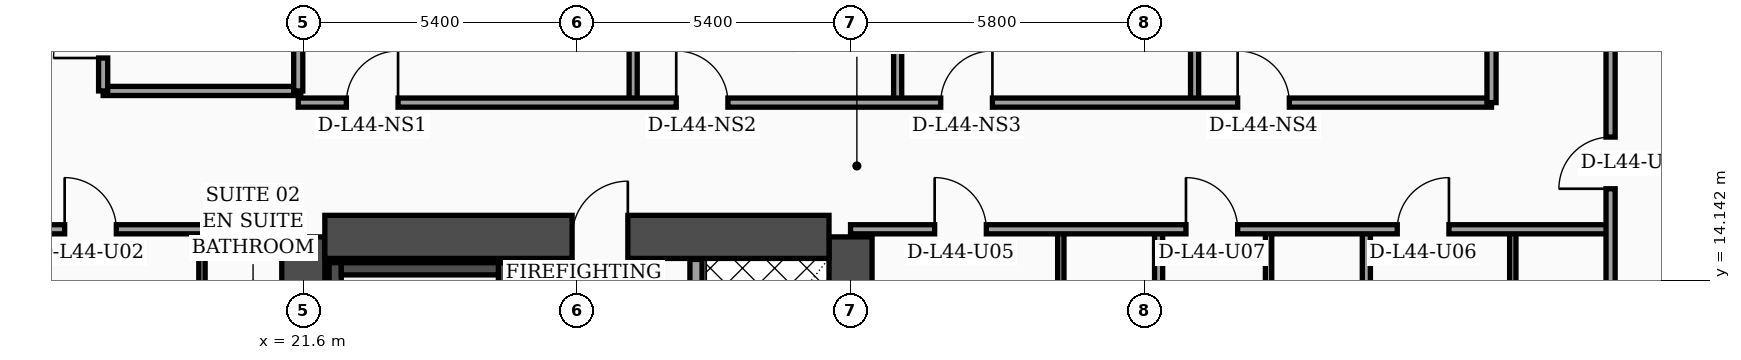
"""IFC4 building model, lengths in metres.
Left out: names, types, materials, properties, quantities, classifications, styles, units other than length and angle.
Written with IfcOpenShell. Run it as: python <this file> out.ifc"""

import sys

from ifc_helpers import new_model, si_unit, direction, frame, frame_2d, origin, place, context, subcontext, project, spatial, rectangle, extrude, element, fill, save


model = new_model("IFC4")
c1 = context("Model", 3, precision=1e-05, world=origin(), true_north=direction((0.0, 1.0)))
c2 = subcontext(c1, "Body", "Model", "MODEL_VIEW")
j1 = project(units=[si_unit("LENGTHUNIT", "METRE"), si_unit("PLANEANGLEUNIT", "RADIAN")], contexts=[c1])
p1 = place(None, origin())
s1 = spatial("IfcSite", under=j1, at=p1, CompositionType="ELEMENT")
p2 = place(p1, origin())
s2 = spatial("IfcBuilding", under=s1, at=p2, CompositionType="ELEMENT")
p3 = place(p2, frame((0.0, 0.0, 178.9)))
s3 = spatial("IfcBuildingStorey", under=s2, at=p3, CompositionType="ELEMENT", Elevation=178.9)
for number, where, z_axis, x_axis in (
    (1, (21.6, 4.6, 0.0), (0.0, 0.0, 1.0), (0.0, 1.0, 0.0)),
    (2, (32.4, 4.6, 0.0), (0.0, 0.0, 1.0), (0.0, 1.0, 0.0)),
):
    element("IfcWall", number, at=place(p3, frame(where, z_axis=z_axis, x_axis=x_axis)), inside=s3, PredefinedType="SHEAR", context=c2, shape_type="SweptSolid", body=[
        extrude(rectangle(XDim=10.4, YDim=0.85, at=frame_2d((5.2, 0.0))), origin(), (0.0, 0.0, 1.0), 3.56),
    ])
p4 = place(p3, frame((22.025, 15.0, 0.0), z_axis=(0.0, 0.0, 1.0), x_axis=(1.0, 0.0, 0.0)))
e3 = element("IfcWall", 3, at=p4, inside=s3, PredefinedType="SHEAR", context=c2, shape_type="SweptSolid", body=[
    extrude(rectangle(XDim=9.95, YDim=0.85, at=frame_2d((4.975, 0.0))), origin(), (0.0, 0.0, 1.0), 3.56),
])
p5 = place(p4, frame((4.88, 0.0, 0.0)))
e4 = element("IfcOpeningElement", 4, at=p5, cuts=e3, PredefinedType="OPENING", context=c2, shape_type="SweptSolid", body=[
    extrude(rectangle(XDim=1.1, YDim=2.2, at=frame_2d((0.55, 1.1))), frame((0.0, 0.435, 0.0), z_axis=(0.0, -1.0, 0.0), x_axis=(1.0, 0.0, 0.0)), (0.0, 0.0, 1.0), 0.87),
])
p6 = place(p3, frame((22.23, 5.025, 0.0), z_axis=(0.0, 0.0, 1.0), x_axis=(0.0, 1.0, 0.0)))
e5 = element("IfcWall", 5, at=p6, inside=s3, PredefinedType="SOLIDWALL", context=c2, shape_type="SweptSolid", body=[
    extrude(rectangle(XDim=9.465, YDim=0.24, at=frame_2d((4.732, 0.0))), origin(), (0.0, 0.0, 1.0), 3.56),
])
p7 = place(p3, frame((25.57, 5.025, 0.0), z_axis=(0.0, 0.0, 1.0), x_axis=(0.0, 1.0, 0.0)))
e6 = element("IfcWall", 6, at=p7, inside=s3, PredefinedType="SOLIDWALL", context=c2, shape_type="SweptSolid", body=[
    extrude(rectangle(XDim=9.465, YDim=0.24, at=frame_2d((4.732, 0.0))), origin(), (0.0, 0.0, 1.0), 3.56),
])
p8 = place(p7, frame((0.35, 0.0, 0.0)))
e7 = element("IfcOpeningElement", 7, at=p8, cuts=e6, PredefinedType="OPENING", context=c2, shape_type="SweptSolid", body=[
    extrude(rectangle(XDim=1.15, YDim=2.2, at=frame_2d((0.575, 1.1))), frame((0.0, 0.13, 0.0), z_axis=(0.0, -1.0, 0.0), x_axis=(1.0, 0.0, 0.0)), (0.0, 0.0, 1.0), 0.26),
])
p9 = place(p3, frame((22.35, 14.37, 0.0), z_axis=(0.0, 0.0, 1.0), x_axis=(1.0, 0.0, 0.0)))
e8 = element("IfcWall", 8, at=p9, inside=s3, PredefinedType="SOLIDWALL", context=c2, shape_type="SweptSolid", body=[
    extrude(rectangle(XDim=3.1, YDim=0.24, at=frame_2d((1.55, 0.0))), origin(), (0.0, 0.0, 1.0), 3.56),
])
p10 = place(p3, frame((29.35, 5.045, 0.0), z_axis=(0.0, 0.0, 1.0), x_axis=(0.0, 1.0, 0.0)))
e9 = element("IfcWall", 9, at=p10, inside=s3, PredefinedType="SOLIDWALL", context=c2, shape_type="SweptSolid", body=[
    extrude(rectangle(XDim=9.51, YDim=0.24, at=frame_2d((4.755, 0.0))), origin(), (0.0, 0.0, 1.0), 3.56),
])
p11 = place(p10, frame((0.55, 0.0, 0.0)))
e10 = element("IfcOpeningElement", 10, at=p11, cuts=e9, PredefinedType="OPENING", context=c2, shape_type="SweptSolid", body=[
    extrude(rectangle(XDim=1.3, YDim=2.35, at=frame_2d((0.65, 1.175))), frame((0.0, 0.13, 0.0), z_axis=(0.0, -1.0, 0.0), x_axis=(1.0, 0.0, 0.0)), (0.0, 0.0, 1.0), 0.26),
])
p12 = place(p3, frame((19.6, 2.44, 0.0), z_axis=(0.0, 0.0, 1.0), x_axis=(0.0, 1.0, 0.0)))
e11 = element("IfcWall", 11, at=p12, inside=s3, PredefinedType="PARTITIONING", context=c2, shape_type="SweptSolid", body=[
    extrude(rectangle(XDim=12.71, YDim=0.125, at=frame_2d((6.355, 0.0))), origin(), (0.0, 0.0, 1.0), 2.49),
])
p13 = place(p12, frame((4.34, 0.0, 0.0)))
e12 = element("IfcOpeningElement", 12, at=p13, cuts=e11, PredefinedType="OPENING", context=c2, shape_type="SweptSolid", body=[
    extrude(rectangle(XDim=0.96, YDim=2.2, at=frame_2d((0.48, 1.1))), frame((0.0, 0.073, 0.0), z_axis=(0.0, -1.0, 0.0), x_axis=(1.0, 0.0, 0.0)), (0.0, 0.0, 1.0), 0.145),
])
p14 = place(p12, frame((10.18, 0.0, 0.0)))
e13 = element("IfcOpeningElement", 13, at=p14, cuts=e11, PredefinedType="OPENING", context=c2, shape_type="SweptSolid", body=[
    extrude(rectangle(XDim=0.9, YDim=2.15, at=frame_2d((0.45, 1.075))), frame((0.0, 0.073, 0.0), z_axis=(0.0, -1.0, 0.0), x_axis=(1.0, 0.0, 0.0)), (0.0, 0.0, 1.0), 0.145),
])
p15 = place(p3, frame((15.15, 15.15, 0.0), z_axis=(0.0, 0.0, 1.0), x_axis=(1.0, 0.0, 0.0)))
e14 = element("IfcWall", 14, at=p15, inside=s3, PredefinedType="PARTITIONING", context=c2, shape_type="SweptSolid", body=[
    extrude(rectangle(XDim=6.45, YDim=0.18, at=frame_2d((3.225, 0.0))), origin(), (0.0, 0.0, 1.0), 2.49),
])
p16 = place(p15, frame((1.74, 0.0, 0.0)))
e15 = element("IfcOpeningElement", 15, at=p16, cuts=e14, PredefinedType="OPENING", context=c2, shape_type="SweptSolid", body=[
    extrude(rectangle(XDim=1.02, YDim=2.2, at=frame_2d((0.51, 1.1))), frame((0.0, 0.1, 0.0), z_axis=(0.0, -1.0, 0.0), x_axis=(1.0, 0.0, 0.0)), (0.0, 0.0, 1.0), 0.2),
])
p17 = place(p3, frame((17.65, 17.88, 0.0), z_axis=(0.0, 0.0, 1.0), x_axis=(1.0, 0.0, 0.0)))
e16 = element("IfcWall", 16, at=p17, inside=s3, PredefinedType="PARTITIONING", context=c2, shape_type="SweptSolid", body=[
    extrude(rectangle(XDim=3.9, YDim=0.18, at=frame_2d((1.95, 0.0))), origin(), (0.0, 0.0, 1.0), 3.56),
])
p18 = place(p3, frame((21.5, 17.88, 0.0), z_axis=(0.0, 0.0, 1.0), x_axis=(0.0, 1.0, 0.0)))
e17 = element("IfcWall", 17, at=p18, inside=s3, PredefinedType="PARTITIONING", context=c2, shape_type="SweptSolid", body=[
    extrude(rectangle(XDim=6.44, YDim=0.18, at=frame_2d((3.22, 0.0))), origin(), (0.0, 0.0, 1.0), 3.09),
])
p19 = place(p3, frame((17.65, 17.88, 0.0), z_axis=(0.0, 0.0, 1.0), x_axis=(0.0, 1.0, 0.0)))
e18 = element("IfcWall", 18, at=p19, inside=s3, PredefinedType="PARTITIONING", context=c2, shape_type="SweptSolid", body=[
    extrude(rectangle(XDim=6.44, YDim=0.18, at=frame_2d((3.22, 0.0))), origin(), (0.0, 0.0, 1.0), 3.09),
])
p20 = place(p19, frame((0.65, 0.0, 0.0)))
e19 = element("IfcOpeningElement", 19, at=p20, cuts=e18, PredefinedType="OPENING", context=c2, shape_type="SweptSolid", body=[
    extrude(rectangle(XDim=0.98, YDim=2.15, at=frame_2d((0.49, 1.075))), frame((0.0, 0.1, 0.0), z_axis=(0.0, -1.0, 0.0), x_axis=(1.0, 0.0, 0.0)), (0.0, 0.0, 1.0), 0.2),
])
p21 = place(p19, frame((3.97, 0.0, 0.0)))
e20 = element("IfcOpeningElement", 20, at=p21, cuts=e18, PredefinedType="OPENING", context=c2, shape_type="SweptSolid", body=[
    extrude(rectangle(XDim=0.96, YDim=2.2, at=frame_2d((0.48, 1.1))), frame((0.0, 0.1, 0.0), z_axis=(0.0, -1.0, 0.0), x_axis=(1.0, 0.0, 0.0)), (0.0, 0.0, 1.0), 0.2),
])
p22 = place(p3, frame((36.55, 2.44, 0.0), z_axis=(0.0, 0.0, 1.0), x_axis=(0.0, 1.0, 0.0)))
e21 = element("IfcWall", 21, at=p22, inside=s3, PredefinedType="PARTITIONING", context=c2, shape_type="SweptSolid", body=[
    extrude(rectangle(XDim=12.71, YDim=0.125, at=frame_2d((6.355, 0.0))), origin(), (0.0, 0.0, 1.0), 2.94),
])
p23 = place(p22, frame((4.35, 0.0, 0.0)))
e22 = element("IfcOpeningElement", 22, at=p23, cuts=e21, PredefinedType="OPENING", context=c2, shape_type="SweptSolid", body=[
    extrude(rectangle(XDim=0.96, YDim=2.2, at=frame_2d((0.48, 1.1))), frame((0.0, 0.073, 0.0), z_axis=(0.0, -1.0, 0.0), x_axis=(1.0, 0.0, 0.0)), (0.0, 0.0, 1.0), 0.145),
])
p24 = place(p22, frame((10.21, 0.0, 0.0)))
e23 = element("IfcOpeningElement", 23, at=p24, cuts=e21, PredefinedType="OPENING", context=c2, shape_type="SweptSolid", body=[
    extrude(rectangle(XDim=0.9, YDim=2.15, at=frame_2d((0.45, 1.075))), frame((0.0, 0.073, 0.0), z_axis=(0.0, -1.0, 0.0), x_axis=(1.0, 0.0, 0.0)), (0.0, 0.0, 1.0), 0.145),
])
p25 = place(p3, frame((40.65, 2.44, 0.0), z_axis=(0.0, 0.0, 1.0), x_axis=(0.0, 1.0, 0.0)))
e24 = element("IfcWall", 24, at=p25, inside=s3, PredefinedType="PARTITIONING", context=c2, shape_type="SweptSolid", body=[
    extrude(rectangle(XDim=12.71, YDim=0.125, at=frame_2d((6.355, 0.0))), origin(), (0.0, 0.0, 1.0), 2.94),
])
p26 = place(p25, frame((4.35, 0.0, 0.0)))
e25 = element("IfcOpeningElement", 25, at=p26, cuts=e24, PredefinedType="OPENING", context=c2, shape_type="SweptSolid", body=[
    extrude(rectangle(XDim=0.96, YDim=2.2, at=frame_2d((0.48, 1.1))), frame((0.0, 0.073, 0.0), z_axis=(0.0, -1.0, 0.0), x_axis=(1.0, 0.0, 0.0)), (0.0, 0.0, 1.0), 0.145),
])
p27 = place(p25, frame((10.21, 0.0, 0.0)))
e26 = element("IfcOpeningElement", 26, at=p27, cuts=e24, PredefinedType="OPENING", context=c2, shape_type="SweptSolid", body=[
    extrude(rectangle(XDim=0.9, YDim=2.15, at=frame_2d((0.45, 1.075))), frame((0.0, 0.073, 0.0), z_axis=(0.0, -1.0, 0.0), x_axis=(1.0, 0.0, 0.0)), (0.0, 0.0, 1.0), 0.145),
])
p28 = place(p3, frame((38.48, 2.44, 0.0), z_axis=(0.0, 0.0, 1.0), x_axis=(0.0, 1.0, 0.0)))
e27 = element("IfcWall", 27, at=p28, inside=s3, PredefinedType="PARTITIONING", context=c2, shape_type="SweptSolid", body=[
    extrude(rectangle(XDim=12.71, YDim=0.16, at=frame_2d((6.355, 0.0))), origin(), (0.0, 0.0, 1.0), 2.94),
])
p29 = place(p3, frame((45.47, 2.44, 0.0), z_axis=(0.0, 0.0, 1.0), x_axis=(0.0, 1.0, 0.0)))
e28 = element("IfcWall", 28, at=p29, inside=s3, PredefinedType="PARTITIONING", context=c2, shape_type="SweptSolid", body=[
    extrude(rectangle(XDim=12.71, YDim=0.125, at=frame_2d((6.355, 0.0))), origin(), (0.0, 0.0, 1.0), 3.04),
])
p30 = place(p29, frame((4.35, 0.0, 0.0)))
e29 = element("IfcOpeningElement", 29, at=p30, cuts=e28, PredefinedType="OPENING", context=c2, shape_type="SweptSolid", body=[
    extrude(rectangle(XDim=0.96, YDim=2.2, at=frame_2d((0.48, 1.1))), frame((0.0, 0.073, 0.0), z_axis=(0.0, -1.0, 0.0), x_axis=(1.0, 0.0, 0.0)), (0.0, 0.0, 1.0), 0.145),
])
p31 = place(p29, frame((10.21, 0.0, 0.0)))
e30 = element("IfcOpeningElement", 30, at=p31, cuts=e28, PredefinedType="OPENING", context=c2, shape_type="SweptSolid", body=[
    extrude(rectangle(XDim=0.9, YDim=2.15, at=frame_2d((0.45, 1.075))), frame((0.0, 0.073, 0.0), z_axis=(0.0, -1.0, 0.0), x_axis=(1.0, 0.0, 0.0)), (0.0, 0.0, 1.0), 0.145),
])
p32 = place(p3, frame((42.58, 2.44, 0.0), z_axis=(0.0, 0.0, 1.0), x_axis=(0.0, 1.0, 0.0)))
e31 = element("IfcWall", 31, at=p32, inside=s3, PredefinedType="PARTITIONING", context=c2, shape_type="SweptSolid", body=[
    extrude(rectangle(XDim=12.71, YDim=0.16, at=frame_2d((6.355, 0.0))), origin(), (0.0, 0.0, 1.0), 3.04),
])
p33 = place(p3, frame((32.4, 15.15, 0.0), z_axis=(0.0, 0.0, 1.0), x_axis=(1.0, 0.0, 0.0)))
e32 = element("IfcWall", 32, at=p33, inside=s3, PredefinedType="PARTITIONING", context=c2, shape_type="SweptSolid", body=[
    extrude(rectangle(XDim=15.0, YDim=0.18, at=frame_2d((7.5, 0.0))), origin(), (0.0, 0.0, 1.0), 2.94),
])
p34 = place(p33, frame((1.66, 0.0, 0.0)))
e33 = element("IfcOpeningElement", 33, at=p34, cuts=e32, PredefinedType="OPENING", context=c2, shape_type="SweptSolid", body=[
    extrude(rectangle(XDim=1.02, YDim=2.2, at=frame_2d((0.51, 1.1))), frame((0.0, 0.1, 0.0), z_axis=(0.0, -1.0, 0.0), x_axis=(1.0, 0.0, 0.0)), (0.0, 0.0, 1.0), 0.2),
])
p35 = place(p33, frame((10.79, 0.0, 0.0)))
e34 = element("IfcOpeningElement", 34, at=p35, cuts=e32, PredefinedType="OPENING", context=c2, shape_type="SweptSolid", body=[
    extrude(rectangle(XDim=1.02, YDim=2.2, at=frame_2d((0.51, 1.1))), frame((0.0, 0.1, 0.0), z_axis=(0.0, -1.0, 0.0), x_axis=(1.0, 0.0, 0.0)), (0.0, 0.0, 1.0), 0.2),
])
p36 = place(p33, frame((6.62, 0.0, 0.0)))
e35 = element("IfcOpeningElement", 35, at=p36, cuts=e32, PredefinedType="OPENING", context=c2, shape_type="SweptSolid", body=[
    extrude(rectangle(XDim=1.02, YDim=2.2, at=frame_2d((0.51, 1.1))), frame((0.0, 0.1, 0.0), z_axis=(0.0, -1.0, 0.0), x_axis=(1.0, 0.0, 0.0)), (0.0, 0.0, 1.0), 0.2),
])
p37 = place(p3, frame((28.11, 17.65, 0.0), z_axis=(0.0, 0.0, 1.0), x_axis=(0.0, 1.0, 0.0)))
e36 = element("IfcWall", 36, at=p37, inside=s3, PredefinedType="PARTITIONING", context=c2, shape_type="SweptSolid", body=[
    extrude(rectangle(XDim=10.46, YDim=0.16, at=frame_2d((5.23, 0.0))), origin(), (0.0, 0.0, 1.0), 2.94),
])
p38 = place(p3, frame((33.33, 17.65, 0.0), z_axis=(0.0, 0.0, 1.0), x_axis=(0.0, 1.0, 0.0)))
e37 = element("IfcWall", 37, at=p38, inside=s3, PredefinedType="PARTITIONING", context=c2, shape_type="SweptSolid", body=[
    extrude(rectangle(XDim=13.37, YDim=0.16, at=frame_2d((6.685, 0.0))), origin(), (0.0, 0.0, 1.0), 2.94),
])
p39 = place(p3, frame((39.19, 17.65, 0.0), z_axis=(0.0, 0.0, 1.0), x_axis=(0.0, 1.0, 0.0)))
e38 = element("IfcWall", 38, at=p39, inside=s3, PredefinedType="PARTITIONING", context=c2, shape_type="SweptSolid", body=[
    extrude(rectangle(XDim=16.63, YDim=0.16, at=frame_2d((8.315, 0.0))), origin(), (0.0, 0.0, 1.0), 2.94),
])
p40 = place(p3, frame((21.5, 17.65, 0.0), z_axis=(0.0, 0.0, 1.0), x_axis=(1.0, 0.0, 0.0)))
e39 = element("IfcWall", 39, at=p40, inside=s3, PredefinedType="PARTITIONING", context=c2, shape_type="SweptSolid", body=[
    extrude(rectangle(XDim=23.55, YDim=0.18, at=frame_2d((11.775, 0.0))), origin(), (0.0, 0.0, 1.0), 2.94),
])
p41 = place(p40, frame((0.95, 0.0, 0.0)))
e40 = element("IfcOpeningElement", 40, at=p41, cuts=e39, PredefinedType="OPENING", context=c2, shape_type="SweptSolid", body=[
    extrude(rectangle(XDim=1.02, YDim=2.2, at=frame_2d((0.51, 1.1))), frame((0.0, 0.1, 0.0), z_axis=(0.0, -1.0, 0.0), x_axis=(1.0, 0.0, 0.0)), (0.0, 0.0, 1.0), 0.2),
])
p42 = place(p40, frame((7.46, 0.0, 0.0)))
e41 = element("IfcOpeningElement", 41, at=p42, cuts=e39, PredefinedType="OPENING", context=c2, shape_type="SweptSolid", body=[
    extrude(rectangle(XDim=1.02, YDim=2.2, at=frame_2d((0.51, 1.1))), frame((0.0, 0.1, 0.0), z_axis=(0.0, -1.0, 0.0), x_axis=(1.0, 0.0, 0.0)), (0.0, 0.0, 1.0), 0.2),
])
p43 = place(p40, frame((12.68, 0.0, 0.0)))
e42 = element("IfcOpeningElement", 42, at=p43, cuts=e39, PredefinedType="OPENING", context=c2, shape_type="SweptSolid", body=[
    extrude(rectangle(XDim=1.02, YDim=2.2, at=frame_2d((0.51, 1.1))), frame((0.0, 0.1, 0.0), z_axis=(0.0, -1.0, 0.0), x_axis=(1.0, 0.0, 0.0)), (0.0, 0.0, 1.0), 0.2),
])
p44 = place(p40, frame((18.54, 0.0, 0.0)))
e43 = element("IfcOpeningElement", 43, at=p44, cuts=e39, PredefinedType="OPENING", context=c2, shape_type="SweptSolid", body=[
    extrude(rectangle(XDim=1.02, YDim=2.2, at=frame_2d((0.51, 1.1))), frame((0.0, 0.1, 0.0), z_axis=(0.0, -1.0, 0.0), x_axis=(1.0, 0.0, 0.0)), (0.0, 0.0, 1.0), 0.2),
])
p45 = place(p3, frame((45.05, 17.65, 0.0), z_axis=(0.0, 0.0, 1.0), x_axis=(0.0, 1.0, 0.0)))
e44 = element("IfcWall", 44, at=p45, inside=s3, PredefinedType="PARTITIONING", context=c2, shape_type="SweptSolid", body=[
    extrude(rectangle(XDim=19.9, YDim=0.18, at=frame_2d((9.95, 0.0))), origin(), (0.0, 0.0, 1.0), 2.94),
])
p46 = place(p3, frame((47.4, 2.44, 0.0), z_axis=(0.0, 0.0, 1.0), x_axis=(0.0, 1.0, 0.0)))
e45 = element("IfcWall", 45, at=p46, inside=s3, PredefinedType="PARTITIONING", context=c2, shape_type="SweptSolid", body=[
    extrude(rectangle(XDim=27.84, YDim=0.18, at=frame_2d((13.92, 0.0))), origin(), (0.0, 0.0, 1.0), 2.94),
])
p47 = place(p46, frame((13.51, 0.0, 0.0)))
e46 = element("IfcOpeningElement", 46, at=p47, cuts=e45, PredefinedType="OPENING", context=c2, shape_type="SweptSolid", body=[
    extrude(rectangle(XDim=1.02, YDim=2.2, at=frame_2d((0.51, 1.1))), frame((0.0, 0.1, 0.0), z_axis=(0.0, -1.0, 0.0), x_axis=(1.0, 0.0, 0.0)), (0.0, 0.0, 1.0), 0.2),
])
p48 = place(p46, frame((21.52, 0.0, 0.0)))
e47 = element("IfcOpeningElement", 47, at=p48, cuts=e45, PredefinedType="OPENING", context=c2, shape_type="SweptSolid", body=[
    extrude(rectangle(XDim=1.02, YDim=2.2, at=frame_2d((0.51, 1.1))), frame((0.0, 0.1, 0.0), z_axis=(0.0, -1.0, 0.0), x_axis=(1.0, 0.0, 0.0)), (0.0, 0.0, 1.0), 0.2),
])
p49 = place(p16, origin())
e48 = element("IfcDoor", 48, at=p49, inside=s3, OperationType="SINGLE_SWING_LEFT", PredefinedType="DOOR", context=c2, shape_type="SweptSolid", body=[
    extrude(rectangle(XDim=1.02, YDim=2.2, at=frame_2d((0.51, 1.1))), frame((0.0, 0.025, 0.0), z_axis=(0.0, -1.0, 0.0), x_axis=(1.0, 0.0, 0.0)), (0.0, 0.0, 1.0), 0.05),
])
fill(e15, e48)
p50 = place(p20, origin())
e49 = element("IfcDoor", 49, at=p50, inside=s3, OperationType="SINGLE_SWING_LEFT", PredefinedType="DOOR", context=c2, shape_type="SweptSolid", body=[
    extrude(rectangle(XDim=0.98, YDim=2.15, at=frame_2d((0.49, 1.075))), frame((0.0, 0.025, 0.0), z_axis=(0.0, -1.0, 0.0), x_axis=(1.0, 0.0, 0.0)), (0.0, 0.0, 1.0), 0.05),
])
fill(e19, e49)
p51 = place(p34, origin())
e50 = element("IfcDoor", 50, at=p51, inside=s3, OperationType="SINGLE_SWING_LEFT", PredefinedType="DOOR", context=c2, shape_type="SweptSolid", body=[
    extrude(rectangle(XDim=1.02, YDim=2.2, at=frame_2d((0.51, 1.1))), frame((0.0, 0.025, 0.0), z_axis=(0.0, -1.0, 0.0), x_axis=(1.0, 0.0, 0.0)), (0.0, 0.0, 1.0), 0.05),
])
fill(e33, e50)
p52 = place(p35, origin())
e51 = element("IfcDoor", 51, at=p52, inside=s3, OperationType="SINGLE_SWING_RIGHT", PredefinedType="DOOR", context=c2, shape_type="SweptSolid", body=[
    extrude(rectangle(XDim=1.02, YDim=2.2, at=frame_2d((0.51, 1.1))), frame((0.0, 0.025, 0.0), z_axis=(0.0, -1.0, 0.0), x_axis=(1.0, 0.0, 0.0)), (0.0, 0.0, 1.0), 0.05),
])
fill(e34, e51)
p53 = place(p36, origin())
e52 = element("IfcDoor", 52, at=p53, inside=s3, OperationType="SINGLE_SWING_LEFT", PredefinedType="DOOR", context=c2, shape_type="SweptSolid", body=[
    extrude(rectangle(XDim=1.02, YDim=2.2, at=frame_2d((0.51, 1.1))), frame((0.0, 0.025, 0.0), z_axis=(0.0, -1.0, 0.0), x_axis=(1.0, 0.0, 0.0)), (0.0, 0.0, 1.0), 0.05),
])
fill(e35, e52)
p54 = place(p41, origin())
e53 = element("IfcDoor", 53, at=p54, inside=s3, OperationType="SINGLE_SWING_RIGHT", PredefinedType="DOOR", context=c2, shape_type="SweptSolid", body=[
    extrude(rectangle(XDim=1.02, YDim=2.2, at=frame_2d((0.51, 1.1))), frame((0.0, 0.025, 0.0), z_axis=(0.0, -1.0, 0.0), x_axis=(1.0, 0.0, 0.0)), (0.0, 0.0, 1.0), 0.05),
])
fill(e40, e53)
p55 = place(p42, origin())
e54 = element("IfcDoor", 54, at=p55, inside=s3, OperationType="SINGLE_SWING_LEFT", PredefinedType="DOOR", context=c2, shape_type="SweptSolid", body=[
    extrude(rectangle(XDim=1.02, YDim=2.2, at=frame_2d((0.51, 1.1))), frame((0.0, 0.025, 0.0), z_axis=(0.0, -1.0, 0.0), x_axis=(1.0, 0.0, 0.0)), (0.0, 0.0, 1.0), 0.05),
])
fill(e41, e54)
p56 = place(p43, origin())
e55 = element("IfcDoor", 55, at=p56, inside=s3, OperationType="SINGLE_SWING_RIGHT", PredefinedType="DOOR", context=c2, shape_type="SweptSolid", body=[
    extrude(rectangle(XDim=1.02, YDim=2.2, at=frame_2d((0.51, 1.1))), frame((0.0, 0.025, 0.0), z_axis=(0.0, -1.0, 0.0), x_axis=(1.0, 0.0, 0.0)), (0.0, 0.0, 1.0), 0.05),
])
fill(e42, e55)
p57 = place(p44, origin())
e56 = element("IfcDoor", 56, at=p57, inside=s3, OperationType="SINGLE_SWING_LEFT", PredefinedType="DOOR", context=c2, shape_type="SweptSolid", body=[
    extrude(rectangle(XDim=1.02, YDim=2.2, at=frame_2d((0.51, 1.1))), frame((0.0, 0.025, 0.0), z_axis=(0.0, -1.0, 0.0), x_axis=(1.0, 0.0, 0.0)), (0.0, 0.0, 1.0), 0.05),
])
fill(e43, e56)
p58 = place(p47, origin())
e57 = element("IfcDoor", 57, at=p58, inside=s3, OperationType="SINGLE_SWING_LEFT", PredefinedType="DOOR", context=c2, shape_type="SweptSolid", body=[
    extrude(rectangle(XDim=1.02, YDim=2.2, at=frame_2d((0.51, 1.1))), frame((0.0, 0.025, 0.0), z_axis=(0.0, -1.0, 0.0), x_axis=(1.0, 0.0, 0.0)), (0.0, 0.0, 1.0), 0.05),
])
fill(e46, e57)
p59 = place(p5, origin())
e58 = element("IfcDoor", 58, at=p59, inside=s3, OperationType="SINGLE_SWING_RIGHT", PredefinedType="DOOR", context=c2, shape_type="SweptSolid", body=[
    extrude(rectangle(XDim=1.1, YDim=2.2, at=frame_2d((0.55, 1.1))), frame((0.0, 0.025, 0.0), z_axis=(0.0, -1.0, 0.0), x_axis=(1.0, 0.0, 0.0)), (0.0, 0.0, 1.0), 0.05),
])
fill(e4, e58)
save(model, sys.argv[1])
